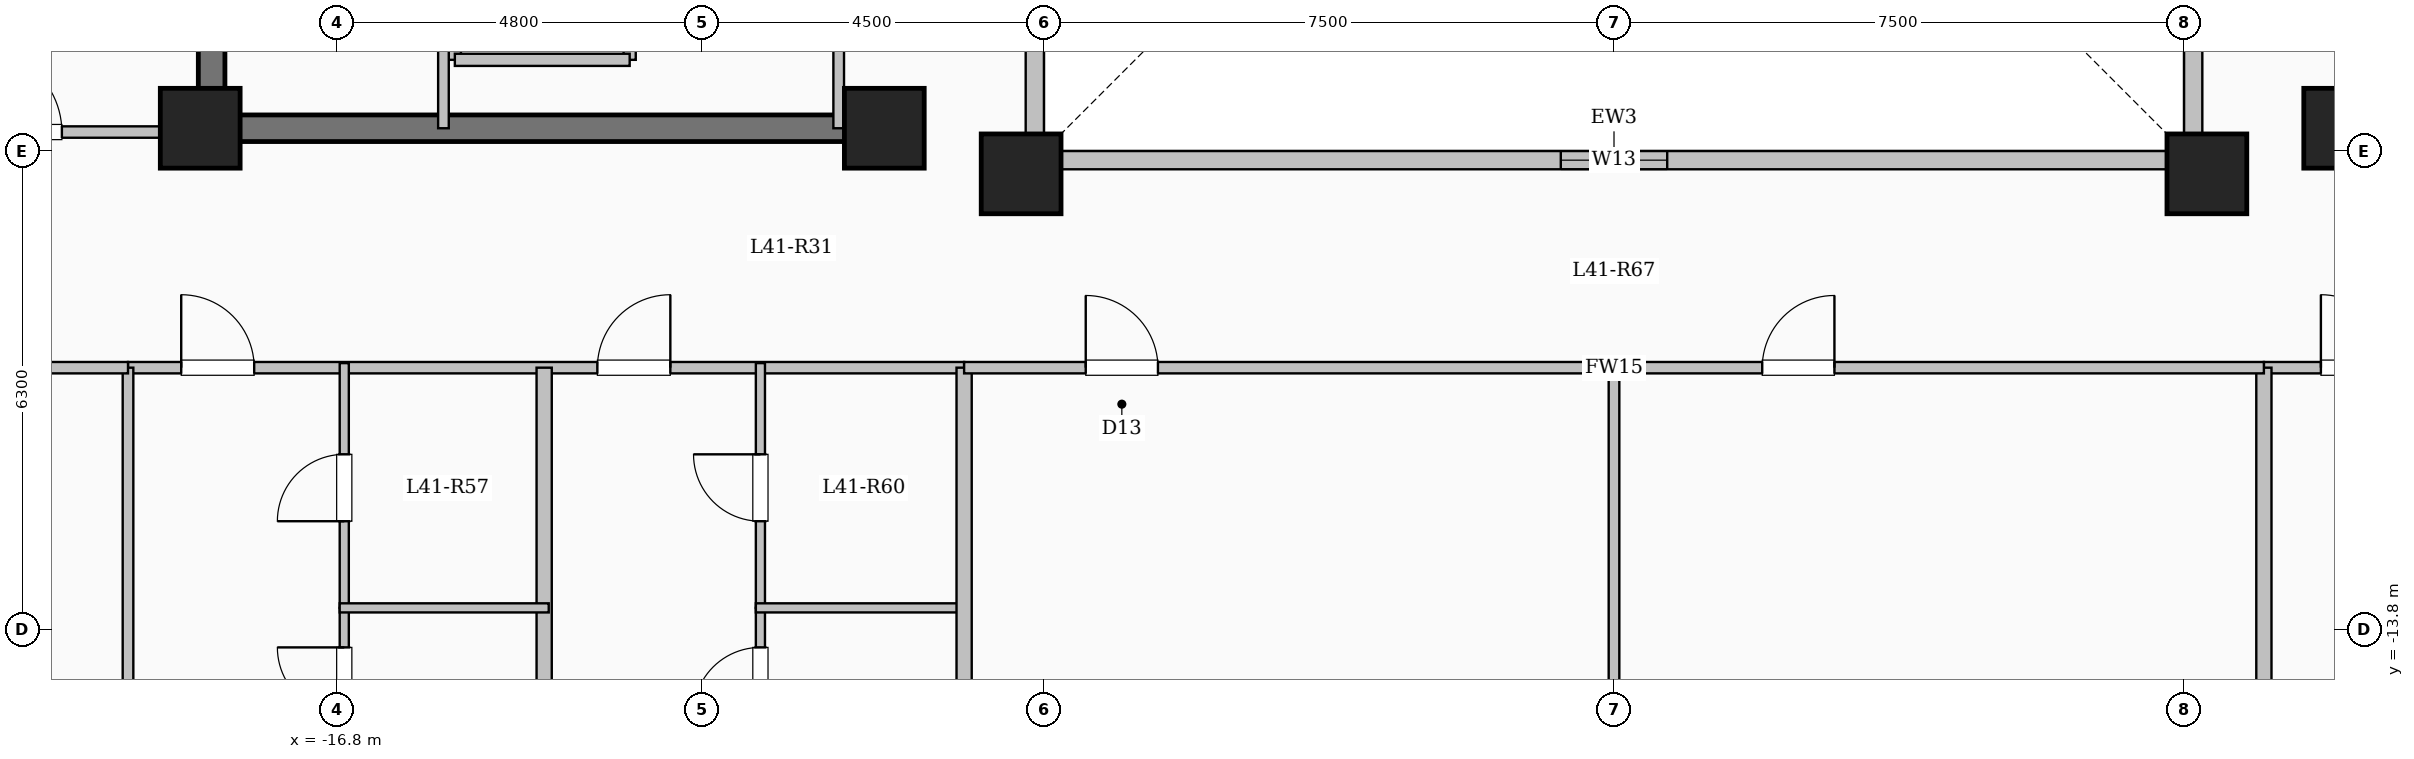
"""IFC4 building model, lengths in metres.
Left out: names, types, materials, properties, quantities, classifications, styles, units other than length and angle.
Written with IfcOpenShell. Run it as: python <this file> out.ifc"""

import sys

from ifc_helpers import new_model, si_unit, direction, frame, frame_2d, origin, origin_2d, place, context, subcontext, project, spatial, rectangle, extrude, element, fill, save


model = new_model("IFC4")
c1 = context("Model", 3, precision=1e-05, world=origin(), true_north=direction((0.0, 1.0)))
c2 = subcontext(c1, "Body", "Model", "MODEL_VIEW")
j1 = project(units=[si_unit("LENGTHUNIT", "METRE"), si_unit("PLANEANGLEUNIT", "RADIAN")], contexts=[c1])
p1 = place(None, origin())
s1 = spatial("IfcSite", under=j1, at=p1, CompositionType="ELEMENT")
p2 = place(p1, origin())
s2 = spatial("IfcBuilding", under=s1, at=p2, CompositionType="ELEMENT")
p3 = place(p2, frame((0.0, 0.0, 152.7)))
s3 = spatial("IfcBuildingStorey", under=s2, at=p3, CompositionType="ELEMENT", Elevation=152.7)
for number, where, z_axis, x_axis in (
    (1, (-7.8, -7.8, 0.0), (0.0, 0.0, 1.0), (1.0, 0.0, 0.0)),
    (2, (7.8, -7.8, 0.0), (0.0, 0.0, 1.0), (1.0, 0.0, 0.0)),
    (3, (-9.6, -7.2, 0.0), (0.0, 0.0, 1.0), (1.0, 0.0, 0.0)),
    (4, (9.6, -7.2, 0.0), (0.0, 0.0, 1.0), (1.0, 0.0, 0.0)),
    (5, (-18.6, -7.2, 0.0), (0.0, 0.0, 1.0), (1.0, 0.0, 0.0)),
):
    element("IfcColumn", number, at=place(p3, frame(where, z_axis=z_axis, x_axis=x_axis)), inside=s3, PredefinedType="COLUMN", context=c2, shape_type="SweptSolid", body=[
        extrude(rectangle(XDim=1.05, YDim=1.05, at=origin_2d()), origin(), (0.0, 0.0, 1.0), 3.35),
    ])
p4 = place(p3, frame((-7.62, -7.62, 0.0), z_axis=(0.0, 0.0, 1.0), x_axis=(1.0, 0.0, 0.0)))
e6 = element("IfcWall", 6, at=p4, inside=s3, PredefinedType="SOLIDWALL", context=c2, shape_type="SweptSolid", body=[
    extrude(rectangle(XDim=15.24, YDim=0.24, at=frame_2d((7.62, 0.0))), origin(), (0.0, 0.0, 1.0), 3.1),
])
p5 = place(p4, frame((6.92, 0.0, 0.95)))
e7 = element("IfcOpeningElement", 7, at=p5, cuts=e6, PredefinedType="OPENING", context=c2, shape_type="SweptSolid", body=[
    extrude(rectangle(XDim=1.4, YDim=1.5, at=frame_2d((0.7, 0.75))), frame((0.0, 0.13, 0.0), z_axis=(0.0, -1.0, 0.0), x_axis=(1.0, 0.0, 0.0)), (0.0, 0.0, 1.0), 0.26),
])
p6 = place(p3, frame((7.62, -7.62, 0.0), z_axis=(0.0, 0.0, 1.0), x_axis=(0.0, 1.0, 0.0)))
e8 = element("IfcWall", 8, at=p6, inside=s3, PredefinedType="SOLIDWALL", context=c2, shape_type="SweptSolid", body=[
    extrude(rectangle(XDim=15.24, YDim=0.24, at=frame_2d((7.62, 0.0))), origin(), (0.0, 0.0, 1.0), 3.1),
])
p7 = place(p6, frame((6.92, 0.0, 0.95)))
e9 = element("IfcOpeningElement", 9, at=p7, cuts=e8, PredefinedType="OPENING", context=c2, shape_type="SweptSolid", body=[
    extrude(rectangle(XDim=1.4, YDim=1.5, at=frame_2d((0.7, 0.75))), frame((0.0, 0.13, 0.0), z_axis=(0.0, -1.0, 0.0), x_axis=(1.0, 0.0, 0.0)), (0.0, 0.0, 1.0), 0.26),
])
p8 = place(p3, frame((-7.62, 7.62, 0.0), z_axis=(0.0, 0.0, 1.0), x_axis=(0.0, -1.0, 0.0)))
e10 = element("IfcWall", 10, at=p8, inside=s3, PredefinedType="SOLIDWALL", context=c2, shape_type="SweptSolid", body=[
    extrude(rectangle(XDim=15.24, YDim=0.24, at=frame_2d((7.62, 0.0))), origin(), (0.0, 0.0, 1.0), 3.1),
])
p9 = place(p8, frame((6.92, 0.0, 0.95)))
e11 = element("IfcOpeningElement", 11, at=p9, cuts=e10, PredefinedType="OPENING", context=c2, shape_type="SweptSolid", body=[
    extrude(rectangle(XDim=1.4, YDim=1.5, at=frame_2d((0.7, 0.75))), frame((0.0, 0.13, 0.0), z_axis=(0.0, -1.0, 0.0), x_axis=(1.0, 0.0, 0.0)), (0.0, 0.0, 1.0), 0.26),
])
for number, where, z_axis, x_axis in (
    (12, (-15.25, -6.3, 0.0), (0.0, 0.0, 1.0), (0.0, 1.0, 0.0)),
    (13, (-12.95, -6.3, 0.0), (0.0, 0.0, 1.0), (0.0, 1.0, 0.0)),
):
    element("IfcWall", number, at=place(p3, frame(where, z_axis=z_axis, x_axis=x_axis)), inside=s3, PredefinedType="SOLIDWALL", context=c2, shape_type="SweptSolid", body=[
        extrude(rectangle(XDim=2.6, YDim=0.16, at=frame_2d((1.3, 0.0))), origin(), (0.0, 0.0, 1.0), 3.1),
    ])
p10 = place(p3, frame((-15.25, -6.3, 0.0), z_axis=(0.0, 0.0, 1.0), x_axis=(1.0, 0.0, 0.0)))
e14 = element("IfcWall", 14, at=p10, inside=s3, PredefinedType="SOLIDWALL", context=c2, shape_type="SweptSolid", body=[
    extrude(rectangle(XDim=2.3, YDim=0.16, at=frame_2d((1.15, 0.0))), origin(), (0.0, 0.0, 1.0), 3.1),
])
p11 = place(p3, frame((-18.45, -7.375, 0.0), z_axis=(0.0, 0.0, 1.0), x_axis=(0.0, 1.0, 0.0)))
e15 = element("IfcWall", 15, at=p11, inside=s3, PredefinedType="SHEAR", context=c2, shape_type="SweptSolid", body=[
    extrude(rectangle(XDim=14.05, YDim=0.35, at=frame_2d((7.025, 0.0))), origin(), (0.0, 0.0, 1.0), 3.35),
])
p12 = place(p3, frame((-18.625, -7.2, 0.0), z_axis=(0.0, 0.0, 1.0), x_axis=(1.0, 0.0, 0.0)))
e16 = element("IfcWall", 16, at=p12, inside=s3, PredefinedType="SHEAR", context=c2, shape_type="SweptSolid", body=[
    extrude(rectangle(XDim=8.55, YDim=0.35, at=frame_2d((4.275, 0.0))), origin(), (0.0, 0.0, 1.0), 3.35),
])
p13 = place(p3, frame((-15.4, -7.2, 0.0), z_axis=(0.0, 0.0, 1.0), x_axis=(0.0, 1.0, 0.0)))
e17 = element("IfcWall", 17, at=p13, inside=s3, PredefinedType="PARTITIONING", context=c2, shape_type="SweptSolid", body=[
    extrude(rectangle(XDim=10.45, YDim=0.14, at=frame_2d((5.225, 0.0))), origin(), (0.0, 0.0, 1.0), 3.1),
])
p14 = place(p13, frame((9.25, 0.0, 0.0)))
e18 = element("IfcOpeningElement", 18, at=p14, cuts=e17, PredefinedType="OPENING", context=c2, shape_type="SweptSolid", body=[
    extrude(rectangle(XDim=0.9, YDim=2.08, at=frame_2d((0.45, 1.04))), frame((0.0, 0.08, 0.0), z_axis=(0.0, -1.0, 0.0), x_axis=(1.0, 0.0, 0.0)), (0.0, 0.0, 1.0), 0.16),
])
p15 = place(p3, frame((-10.2, -7.2, 0.0), z_axis=(0.0, 0.0, 1.0), x_axis=(0.0, 1.0, 0.0)))
e19 = element("IfcWall", 19, at=p15, inside=s3, PredefinedType="PARTITIONING", context=c2, shape_type="SweptSolid", body=[
    extrude(rectangle(XDim=9.12, YDim=0.14, at=frame_2d((4.56, 0.0))), origin(), (0.0, 0.0, 1.0), 3.1),
])
p16 = place(p15, frame((1.9, 0.0, 0.0)))
e20 = element("IfcOpeningElement", 20, at=p16, cuts=e19, PredefinedType="OPENING", context=c2, shape_type="SweptSolid", body=[
    extrude(rectangle(XDim=0.95, YDim=2.12, at=frame_2d((0.475, 1.06))), frame((0.0, 0.08, 0.0), z_axis=(0.0, -1.0, 0.0), x_axis=(1.0, 0.0, 0.0)), (0.0, 0.0, 1.0), 0.16),
])
p17 = place(p15, frame((5.8, 0.0, 0.0)))
e21 = element("IfcOpeningElement", 21, at=p17, cuts=e19, PredefinedType="OPENING", context=c2, shape_type="SweptSolid", body=[
    extrude(rectangle(XDim=0.95, YDim=2.12, at=frame_2d((0.475, 1.06))), frame((0.0, 0.08, 0.0), z_axis=(0.0, -1.0, 0.0), x_axis=(1.0, 0.0, 0.0)), (0.0, 0.0, 1.0), 0.16),
])
p18 = place(p3, frame((-19.55, -10.35, 0.0), z_axis=(0.0, 0.0, 1.0), x_axis=(1.0, 0.0, 0.0)))
e22 = element("IfcWall", 22, at=p18, inside=s3, PredefinedType="PARTITIONING", context=c2, shape_type="SweptSolid", body=[
    extrude(rectangle(XDim=11.0, YDim=0.15, at=frame_2d((5.5, 0.0))), origin(), (0.0, 0.0, 1.0), 3.1),
])
p19 = place(p18, frame((0.7, 0.0, 0.0)))
e23 = element("IfcOpeningElement", 23, at=p19, cuts=e22, PredefinedType="OPENING", context=c2, shape_type="SweptSolid", body=[
    extrude(rectangle(XDim=0.96, YDim=2.15, at=frame_2d((0.48, 1.075))), frame((0.0, 0.085, 0.0), z_axis=(0.0, -1.0, 0.0), x_axis=(1.0, 0.0, 0.0)), (0.0, 0.0, 1.0), 0.17),
])
p20 = place(p18, frame((6.175, 0.0, 0.0)))
e24 = element("IfcOpeningElement", 24, at=p20, cuts=e22, PredefinedType="OPENING", context=c2, shape_type="SweptSolid", body=[
    extrude(rectangle(XDim=0.96, YDim=2.15, at=frame_2d((0.48, 1.075))), frame((0.0, 0.085, 0.0), z_axis=(0.0, -1.0, 0.0), x_axis=(1.0, 0.0, 0.0)), (0.0, 0.0, 1.0), 0.17),
])
p21 = place(p3, frame((8.55, -10.35, 0.0), z_axis=(0.0, 0.0, 1.0), x_axis=(1.0, 0.0, 0.0)))
e25 = element("IfcWall", 25, at=p21, inside=s3, PredefinedType="PARTITIONING", context=c2, shape_type="SweptSolid", body=[
    extrude(rectangle(XDim=11.0, YDim=0.15, at=frame_2d((5.5, 0.0))), origin(), (0.0, 0.0, 1.0), 3.1),
])
p22 = place(p21, frame((0.75, 0.0, 0.0)))
e26 = element("IfcOpeningElement", 26, at=p22, cuts=e25, PredefinedType="OPENING", context=c2, shape_type="SweptSolid", body=[
    extrude(rectangle(XDim=0.96, YDim=2.15, at=frame_2d((0.48, 1.075))), frame((0.0, 0.085, 0.0), z_axis=(0.0, -1.0, 0.0), x_axis=(1.0, 0.0, 0.0)), (0.0, 0.0, 1.0), 0.17),
])
p23 = place(p21, frame((6.006, 0.0, 0.0)))
e27 = element("IfcOpeningElement", 27, at=p23, cuts=e25, PredefinedType="OPENING", context=c2, shape_type="SweptSolid", body=[
    extrude(rectangle(XDim=0.96, YDim=2.15, at=frame_2d((0.48, 1.075))), frame((0.0, 0.085, 0.0), z_axis=(0.0, -1.0, 0.0), x_axis=(1.0, 0.0, 0.0)), (0.0, 0.0, 1.0), 0.17),
])
p24 = place(p3, frame((-14.075, -21.2, 0.0), z_axis=(0.0, 0.0, 1.0), x_axis=(0.0, 1.0, 0.0)))
e28 = element("IfcWall", 28, at=p24, inside=s3, PredefinedType="SOLIDWALL", context=c2, shape_type="SweptSolid", body=[
    extrude(rectangle(XDim=10.85, YDim=0.2, at=frame_2d((5.425, 0.0))), origin(), (0.0, 0.0, 1.0), 3.1),
])
p25 = place(p3, frame((-16.705, -21.2, 0.0), z_axis=(0.0, 0.0, 1.0), x_axis=(0.0, 1.0, 0.0)))
e29 = element("IfcWall", 29, at=p25, inside=s3, PredefinedType="PARTITIONING", context=c2, shape_type="SweptSolid", body=[
    extrude(rectangle(XDim=7.69, YDim=0.12, at=frame_2d((3.845, 0.0))), origin(), (0.0, 0.0, 1.0), 3.1),
])
p26 = place(p25, frame((6.29, 0.0, 0.0)))
e30 = element("IfcOpeningElement", 30, at=p26, cuts=e29, PredefinedType="OPENING", context=c2, shape_type="SweptSolid", body=[
    extrude(rectangle(XDim=0.88, YDim=2.1, at=frame_2d((0.44, 1.05))), frame((0.0, 0.07, 0.0), z_axis=(0.0, -1.0, 0.0), x_axis=(1.0, 0.0, 0.0)), (0.0, 0.0, 1.0), 0.14),
])
p27 = place(p3, frame((-16.705, -13.51, 0.0), z_axis=(0.0, 0.0, 1.0), x_axis=(0.0, 1.0, 0.0)))
e31 = element("IfcWall", 31, at=p27, inside=s3, PredefinedType="PARTITIONING", context=c2, shape_type="SweptSolid", body=[
    extrude(rectangle(XDim=3.22, YDim=0.12, at=frame_2d((1.61, 0.0))), origin(), (0.0, 0.0, 1.0), 3.1),
])
p28 = place(p27, frame((1.14, 0.0, 0.0)))
e32 = element("IfcOpeningElement", 32, at=p28, cuts=e31, PredefinedType="OPENING", context=c2, shape_type="SweptSolid", body=[
    extrude(rectangle(XDim=0.88, YDim=2.1, at=frame_2d((0.44, 1.05))), frame((0.0, 0.07, 0.0), z_axis=(0.0, -1.0, 0.0), x_axis=(1.0, 0.0, 0.0)), (0.0, 0.0, 1.0), 0.14),
])
p29 = place(p3, frame((-16.765, -13.51, 0.0), z_axis=(0.0, 0.0, 1.0), x_axis=(1.0, 0.0, 0.0)))
e33 = element("IfcWall", 33, at=p29, inside=s3, PredefinedType="PARTITIONING", context=c2, shape_type="SweptSolid", body=[
    extrude(rectangle(XDim=2.75, YDim=0.12, at=frame_2d((1.375, 0.0))), origin(), (0.0, 0.0, 1.0), 3.1),
])
p30 = place(p3, frame((-11.23, -21.2, 0.0), z_axis=(0.0, 0.0, 1.0), x_axis=(0.0, 1.0, 0.0)))
e34 = element("IfcWall", 34, at=p30, inside=s3, PredefinedType="PARTITIONING", context=c2, shape_type="SweptSolid", body=[
    extrude(rectangle(XDim=7.69, YDim=0.12, at=frame_2d((3.845, 0.0))), origin(), (0.0, 0.0, 1.0), 3.1),
])
p31 = place(p30, frame((6.29, 0.0, 0.0)))
e35 = element("IfcOpeningElement", 35, at=p31, cuts=e34, PredefinedType="OPENING", context=c2, shape_type="SweptSolid", body=[
    extrude(rectangle(XDim=0.88, YDim=2.1, at=frame_2d((0.44, 1.05))), frame((0.0, 0.07, 0.0), z_axis=(0.0, -1.0, 0.0), x_axis=(1.0, 0.0, 0.0)), (0.0, 0.0, 1.0), 0.14),
])
p32 = place(p3, frame((-11.23, -13.51, 0.0), z_axis=(0.0, 0.0, 1.0), x_axis=(0.0, 1.0, 0.0)))
e36 = element("IfcWall", 36, at=p32, inside=s3, PredefinedType="PARTITIONING", context=c2, shape_type="SweptSolid", body=[
    extrude(rectangle(XDim=3.22, YDim=0.12, at=frame_2d((1.61, 0.0))), origin(), (0.0, 0.0, 1.0), 3.1),
])
p33 = place(p32, frame((1.14, 0.0, 0.0)))
e37 = element("IfcOpeningElement", 37, at=p33, cuts=e36, PredefinedType="OPENING", context=c2, shape_type="SweptSolid", body=[
    extrude(rectangle(XDim=0.88, YDim=2.1, at=frame_2d((0.44, 1.05))), frame((0.0, 0.07, 0.0), z_axis=(0.0, -1.0, 0.0), x_axis=(1.0, 0.0, 0.0)), (0.0, 0.0, 1.0), 0.14),
])
p34 = place(p3, frame((-11.29, -13.51, 0.0), z_axis=(0.0, 0.0, 1.0), x_axis=(1.0, 0.0, 0.0)))
e38 = element("IfcWall", 38, at=p34, inside=s3, PredefinedType="PARTITIONING", context=c2, shape_type="SweptSolid", body=[
    extrude(rectangle(XDim=2.75, YDim=0.12, at=frame_2d((1.375, 0.0))), origin(), (0.0, 0.0, 1.0), 3.1),
])
for number, where, z_axis, x_axis in (
    (39, (-8.55, -21.804, 0.0), (0.0, 0.0, 1.0), (0.0, 1.0, 0.0)),
    (40, (8.55, -21.804, 0.0), (0.0, 0.0, 1.0), (0.0, 1.0, 0.0)),
):
    element("IfcWall", number, at=place(p3, frame(where, z_axis=z_axis, x_axis=x_axis)), inside=s3, PredefinedType="SOLIDWALL", context=c2, shape_type="SweptSolid", body=[
        extrude(rectangle(XDim=11.454, YDim=0.2, at=frame_2d((5.727, 0.0))), origin(), (0.0, 0.0, 1.0), 3.1),
    ])
p35 = place(p3, frame((-8.55, -10.35, 0.0), z_axis=(0.0, 0.0, 1.0), x_axis=(1.0, 0.0, 0.0)))
e41 = element("IfcWall", 41, at=p35, inside=s3, PredefinedType="PARTITIONING", context=c2, shape_type="SweptSolid", body=[
    extrude(rectangle(XDim=17.1, YDim=0.15, at=frame_2d((8.55, 0.0))), origin(), (0.0, 0.0, 1.0), 3.1),
])
p36 = place(p35, frame((1.6, 0.0, 0.0)))
e42 = element("IfcOpeningElement", 42, at=p36, cuts=e41, PredefinedType="OPENING", context=c2, shape_type="SweptSolid", body=[
    extrude(rectangle(XDim=0.95, YDim=2.15, at=frame_2d((0.475, 1.075))), frame((0.0, 0.085, 0.0), z_axis=(0.0, -1.0, 0.0), x_axis=(1.0, 0.0, 0.0)), (0.0, 0.0, 1.0), 0.17),
])
p37 = place(p35, frame((10.5, 0.0, 0.0)))
e43 = element("IfcOpeningElement", 43, at=p37, cuts=e41, PredefinedType="OPENING", context=c2, shape_type="SweptSolid", body=[
    extrude(rectangle(XDim=0.95, YDim=2.15, at=frame_2d((0.475, 1.075))), frame((0.0, 0.085, 0.0), z_axis=(0.0, -1.0, 0.0), x_axis=(1.0, 0.0, 0.0)), (0.0, 0.0, 1.0), 0.17),
])
p38 = place(p3, frame((0.0, -22.68, 0.0), z_axis=(0.0, 0.0, 1.0), x_axis=(0.0, 1.0, 0.0)))
e44 = element("IfcWall", 44, at=p38, inside=s3, PredefinedType="PARTITIONING", context=c2, shape_type="SweptSolid", body=[
    extrude(rectangle(XDim=12.33, YDim=0.14, at=frame_2d((6.165, 0.0))), origin(), (0.0, 0.0, 1.0), 3.1),
])
p39 = place(p3, frame((-25.08, -7.25, 0.0), z_axis=(0.0, 0.0, 1.0), x_axis=(1.0, 0.0, 0.0)))
e45 = element("IfcWall", 45, at=p39, inside=s3, PredefinedType="PARTITIONING", context=c2, shape_type="SweptSolid", body=[
    extrude(rectangle(XDim=6.63, YDim=0.15, at=frame_2d((3.315, 0.0))), origin(), (0.0, 0.0, 1.0), 3.1),
])
p40 = place(p39, frame((3.58, 0.0, 0.0)))
e46 = element("IfcOpeningElement", 46, at=p40, cuts=e45, PredefinedType="OPENING", context=c2, shape_type="SweptSolid", body=[
    extrude(rectangle(XDim=1.08, YDim=2.15, at=frame_2d((0.54, 1.075))), frame((0.0, 0.085, 0.0), z_axis=(0.0, -1.0, 0.0), x_axis=(1.0, 0.0, 0.0)), (0.0, 0.0, 1.0), 0.17),
])
p41 = place(p3, frame((-19.55, -17.25, 0.0), z_axis=(0.0, 0.0, 1.0), x_axis=(0.0, 1.0, 0.0)))
e47 = element("IfcWall", 47, at=p41, inside=s3, PredefinedType="PARTITIONING", context=c2, shape_type="SweptSolid", body=[
    extrude(rectangle(XDim=6.9, YDim=0.14, at=frame_2d((3.45, 0.0))), origin(), (0.0, 0.0, 1.0), 3.1),
])
p42 = place(p3, frame((-25.08, -10.35, 0.0), z_axis=(0.0, 0.0, 1.0), x_axis=(1.0, 0.0, 0.0)))
e48 = element("IfcWall", 48, at=p42, inside=s3, PredefinedType="PARTITIONING", context=c2, shape_type="SweptSolid", body=[
    extrude(rectangle(XDim=5.53, YDim=0.15, at=frame_2d((2.765, 0.0))), origin(), (0.0, 0.0, 1.0), 3.1),
])
p43 = place(p42, frame((2.29, 0.0, 0.0)))
e49 = element("IfcOpeningElement", 49, at=p43, cuts=e48, PredefinedType="OPENING", context=c2, shape_type="SweptSolid", body=[
    extrude(rectangle(XDim=0.95, YDim=2.15, at=frame_2d((0.475, 1.075))), frame((0.0, 0.085, 0.0), z_axis=(0.0, -1.0, 0.0), x_axis=(1.0, 0.0, 0.0)), (0.0, 0.0, 1.0), 0.17),
])
p44 = place(p5, origin())
e50 = element("IfcWindow", 50, at=p44, inside=s3, PartitioningType="SINGLE_PANEL", PredefinedType="WINDOW", context=c2, shape_type="SweptSolid", body=[
    extrude(rectangle(XDim=1.4, YDim=1.5, at=frame_2d((0.7, 0.75))), frame((0.0, 0.03, 0.0), z_axis=(0.0, -1.0, 0.0), x_axis=(1.0, 0.0, 0.0)), (0.0, 0.0, 1.0), 0.06),
])
fill(e7, e50)
p45 = place(p19, origin())
e51 = element("IfcDoor", 51, at=p45, inside=s3, OperationType="SINGLE_SWING_LEFT", PredefinedType="DOOR", context=c2, shape_type="SweptSolid", body=[
    extrude(rectangle(XDim=0.96, YDim=2.15, at=frame_2d((0.48, 1.075))), frame((0.0, 0.025, 0.0), z_axis=(0.0, -1.0, 0.0), x_axis=(1.0, 0.0, 0.0)), (0.0, 0.0, 1.0), 0.05),
])
fill(e23, e51)
p46 = place(p26, origin())
e52 = element("IfcDoor", 52, at=p46, inside=s3, OperationType="SINGLE_SWING_RIGHT", PredefinedType="DOOR", context=c2, shape_type="SweptSolid", body=[
    extrude(rectangle(XDim=0.88, YDim=2.1, at=frame_2d((0.44, 1.05))), frame((0.0, 0.025, 0.0), z_axis=(0.0, -1.0, 0.0), x_axis=(1.0, 0.0, 0.0)), (0.0, 0.0, 1.0), 0.05),
])
fill(e30, e52)
p47 = place(p28, origin())
e53 = element("IfcDoor", 53, at=p47, inside=s3, OperationType="SINGLE_SWING_LEFT", PredefinedType="DOOR", context=c2, shape_type="SweptSolid", body=[
    extrude(rectangle(XDim=0.88, YDim=2.1, at=frame_2d((0.44, 1.05))), frame((0.0, 0.025, 0.0), z_axis=(0.0, -1.0, 0.0), x_axis=(1.0, 0.0, 0.0)), (0.0, 0.0, 1.0), 0.05),
])
fill(e32, e53)
p48 = place(p20, origin())
e54 = element("IfcDoor", 54, at=p48, inside=s3, OperationType="SINGLE_SWING_RIGHT", PredefinedType="DOOR", context=c2, shape_type="SweptSolid", body=[
    extrude(rectangle(XDim=0.96, YDim=2.15, at=frame_2d((0.48, 1.075))), frame((0.0, 0.025, 0.0), z_axis=(0.0, -1.0, 0.0), x_axis=(1.0, 0.0, 0.0)), (0.0, 0.0, 1.0), 0.05),
])
fill(e24, e54)
p49 = place(p31, origin())
e55 = element("IfcDoor", 55, at=p49, inside=s3, OperationType="SINGLE_SWING_LEFT", PredefinedType="DOOR", context=c2, shape_type="SweptSolid", body=[
    extrude(rectangle(XDim=0.88, YDim=2.1, at=frame_2d((0.44, 1.05))), frame((0.0, 0.025, 0.0), z_axis=(0.0, -1.0, 0.0), x_axis=(1.0, 0.0, 0.0)), (0.0, 0.0, 1.0), 0.05),
])
fill(e35, e55)
p50 = place(p33, origin())
e56 = element("IfcDoor", 56, at=p50, inside=s3, OperationType="SINGLE_SWING_RIGHT", PredefinedType="DOOR", context=c2, shape_type="SweptSolid", body=[
    extrude(rectangle(XDim=0.88, YDim=2.1, at=frame_2d((0.44, 1.05))), frame((0.0, 0.025, 0.0), z_axis=(0.0, -1.0, 0.0), x_axis=(1.0, 0.0, 0.0)), (0.0, 0.0, 1.0), 0.05),
])
fill(e37, e56)
p51 = place(p22, origin())
e57 = element("IfcDoor", 57, at=p51, inside=s3, OperationType="SINGLE_SWING_LEFT", PredefinedType="DOOR", context=c2, shape_type="SweptSolid", body=[
    extrude(rectangle(XDim=0.96, YDim=2.15, at=frame_2d((0.48, 1.075))), frame((0.0, 0.025, 0.0), z_axis=(0.0, -1.0, 0.0), x_axis=(1.0, 0.0, 0.0)), (0.0, 0.0, 1.0), 0.05),
])
fill(e26, e57)
p52 = place(p36, origin())
e58 = element("IfcDoor", 58, at=p52, inside=s3, OperationType="SINGLE_SWING_LEFT", PredefinedType="DOOR", context=c2, shape_type="SweptSolid", body=[
    extrude(rectangle(XDim=0.95, YDim=2.15, at=frame_2d((0.475, 1.075))), frame((0.0, 0.025, 0.0), z_axis=(0.0, -1.0, 0.0), x_axis=(1.0, 0.0, 0.0)), (0.0, 0.0, 1.0), 0.05),
])
fill(e42, e58)
p53 = place(p37, origin())
e59 = element("IfcDoor", 59, at=p53, inside=s3, OperationType="SINGLE_SWING_RIGHT", PredefinedType="DOOR", context=c2, shape_type="SweptSolid", body=[
    extrude(rectangle(XDim=0.95, YDim=2.15, at=frame_2d((0.475, 1.075))), frame((0.0, 0.025, 0.0), z_axis=(0.0, -1.0, 0.0), x_axis=(1.0, 0.0, 0.0)), (0.0, 0.0, 1.0), 0.05),
])
fill(e43, e59)
p54 = place(p40, origin())
e60 = element("IfcDoor", 60, at=p54, inside=s3, OperationType="SINGLE_SWING_LEFT", PredefinedType="DOOR", context=c2, shape_type="SweptSolid", body=[
    extrude(rectangle(XDim=1.08, YDim=2.15, at=frame_2d((0.54, 1.075))), frame((0.0, 0.025, 0.0), z_axis=(0.0, -1.0, 0.0), x_axis=(1.0, 0.0, 0.0)), (0.0, 0.0, 1.0), 0.05),
])
fill(e46, e60)
save(model, sys.argv[1])
